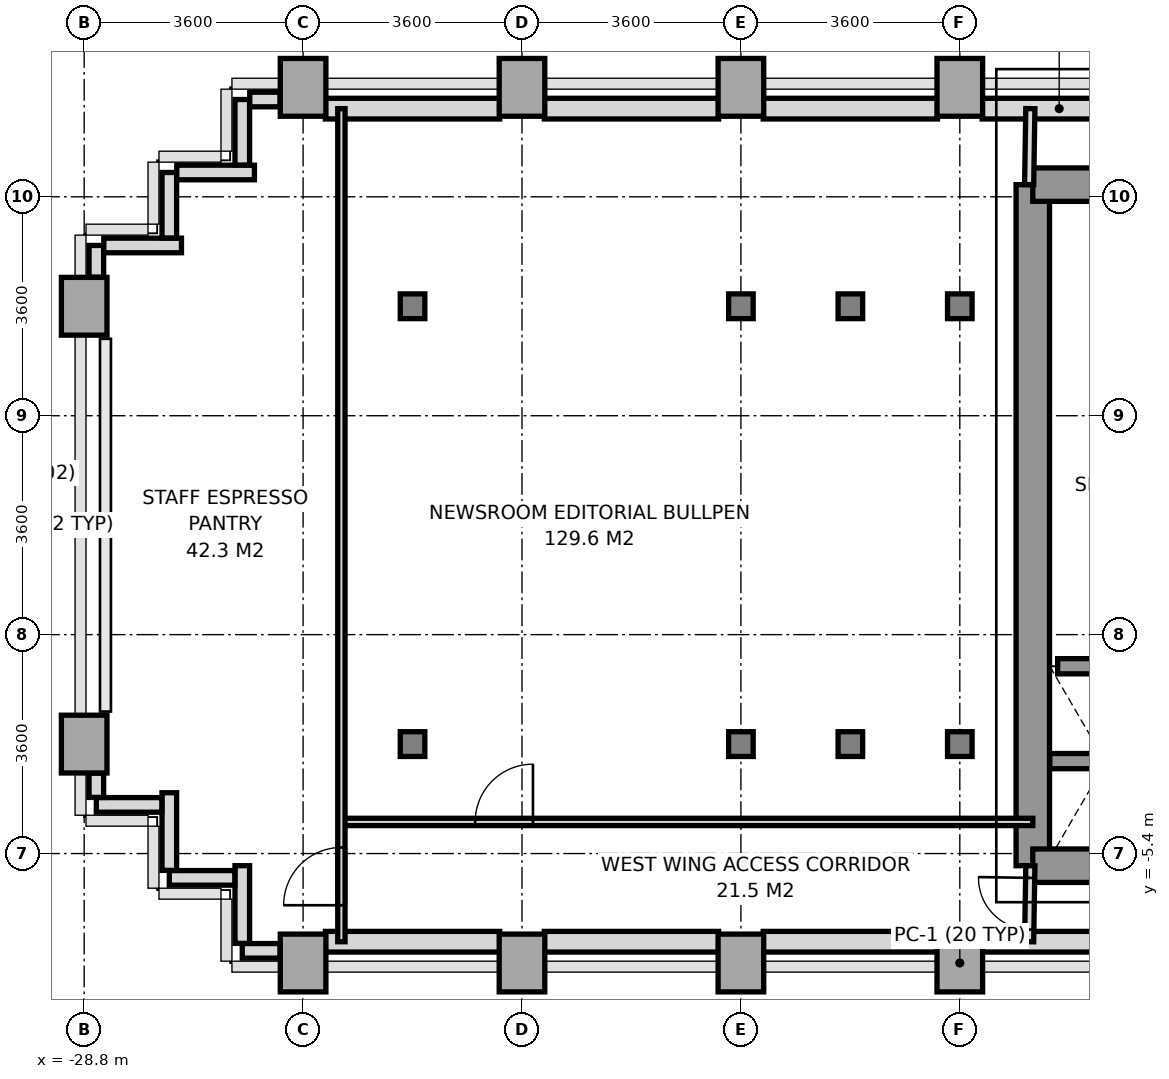
"""IFC4 building model, lengths in metres.
Left out: names, types, materials, properties, quantities, classifications, styles, units other than length and angle.
Written with IfcOpenShell. Run it as: python <this file> out.ifc"""

import sys

from ifc_helpers import new_model, si_unit, direction, frame, frame_2d, origin, origin_2d, place, context, subcontext, project, spatial, rectangle, i_section, extrude, source, transform, mapped, element, fill, save


model = new_model("IFC4")
c1 = context("Model", 3, precision=1e-05, world=origin(), true_north=direction((0.0, 1.0)))
c2 = subcontext(c1, "Body", "Model", "MODEL_VIEW")
j1 = project(units=[si_unit("LENGTHUNIT", "METRE"), si_unit("PLANEANGLEUNIT", "RADIAN")], contexts=[c1])
p1 = place(None, origin())
s1 = spatial("IfcSite", under=j1, at=p1, CompositionType="ELEMENT")
p2 = place(p1, origin())
s2 = spatial("IfcBuilding", under=s1, at=p2, CompositionType="ELEMENT")
p3 = place(p2, frame((0.0, 0.0, 34.0)))
s3 = spatial("IfcBuildingStorey", under=s2, at=p3, CompositionType="ELEMENT", Elevation=34.0)
m1 = source(origin(), c2, "Body", "SweptSolid", [
    extrude(rectangle(XDim=0.75, YDim=0.95, at=origin_2d()), origin(), (0.0, 0.0, 1.0), 3.2),
])
for number, where, z_axis, x_axis in (
    (1, (-28.8, -3.6, 0.0), (0.0, 0.0, 1.0), (1.0, 0.0, 0.0)),
    (2, (-28.8, 3.6, 0.0), (0.0, 0.0, 1.0), (1.0, 0.0, 0.0)),
    (3, (-25.2, -7.2, 0.0), (0.0, 0.0, 1.0), (1.0, 0.0, 0.0)),
    (4, (-25.2, 7.2, 0.0), (0.0, 0.0, 1.0), (1.0, 0.0, 0.0)),
):
    element("IfcColumn", number, at=place(p3, frame(where, z_axis=z_axis, x_axis=x_axis)), inside=s3, PredefinedType="COLUMN", context=c2, shape_type="MappedRepresentation", body=[
        mapped(m1, transform((0.0, 0.0, 0.0), x_axis=(1.0, 0.0, 0.0), y_axis=(0.0, 1.0, 0.0), z_axis=(0.0, 0.0, 1.0), scale=1.0)),
    ])
m2 = source(origin(), c2, "Body", "SweptSolid", [
    extrude(i_section(OverallWidth=0.404, OverallDepth=0.407, WebThickness=0.022, FlangeThickness=0.035, at=origin_2d()), origin(), (0.0, 0.0, 1.0), 3.2),
])
for number, where, z_axis, x_axis in (
    (5, (-23.4, -3.6, 0.0), (0.0, 0.0, 1.0), (1.0, 0.0, 0.0)),
    (6, (-23.4, 3.6, 0.0), (0.0, 0.0, 1.0), (1.0, 0.0, 0.0)),
):
    element("IfcColumn", number, at=place(p3, frame(where, z_axis=z_axis, x_axis=x_axis)), inside=s3, PredefinedType="COLUMN", context=c2, shape_type="MappedRepresentation", body=[
        mapped(m2, transform((0.0, 0.0, 0.0), x_axis=(1.0, 0.0, 0.0), y_axis=(0.0, 1.0, 0.0), z_axis=(0.0, 0.0, 1.0), scale=1.0)),
    ])
for number, where, z_axis, x_axis in (
    (7, (-21.6, -7.2, 0.0), (0.0, 0.0, 1.0), (1.0, 0.0, 0.0)),
    (8, (-21.6, 7.2, 0.0), (0.0, 0.0, 1.0), (1.0, 0.0, 0.0)),
    (9, (-18.0, -7.2, 0.0), (0.0, 0.0, 1.0), (1.0, 0.0, 0.0)),
):
    element("IfcColumn", number, at=place(p3, frame(where, z_axis=z_axis, x_axis=x_axis)), inside=s3, PredefinedType="COLUMN", context=c2, shape_type="MappedRepresentation", body=[
        mapped(m1, transform((0.0, 0.0, 0.0), x_axis=(1.0, 0.0, 0.0), y_axis=(0.0, 1.0, 0.0), z_axis=(0.0, 0.0, 1.0), scale=1.0)),
    ])
for number, where, z_axis, x_axis in (
    (10, (-18.0, -3.6, 0.0), (0.0, 0.0, 1.0), (1.0, 0.0, 0.0)),
    (11, (-18.0, 3.6, 0.0), (0.0, 0.0, 1.0), (1.0, 0.0, 0.0)),
):
    element("IfcColumn", number, at=place(p3, frame(where, z_axis=z_axis, x_axis=x_axis)), inside=s3, PredefinedType="COLUMN", context=c2, shape_type="MappedRepresentation", body=[
        mapped(m2, transform((0.0, 0.0, 0.0), x_axis=(1.0, 0.0, 0.0), y_axis=(0.0, 1.0, 0.0), z_axis=(0.0, 0.0, 1.0), scale=1.0)),
    ])
p4 = place(p3, frame((-18.0, 7.2, 0.0), z_axis=(0.0, 0.0, 1.0), x_axis=(1.0, 0.0, 0.0)))
e12 = element("IfcColumn", 12, at=p4, inside=s3, PredefinedType="COLUMN", context=c2, shape_type="MappedRepresentation", body=[
    mapped(m1, transform((0.0, 0.0, 0.0), x_axis=(1.0, 0.0, 0.0), y_axis=(0.0, 1.0, 0.0), z_axis=(0.0, 0.0, 1.0), scale=1.0)),
])
for number, where, z_axis, x_axis in (
    (13, (-16.2, -3.6, 0.0), (0.0, 0.0, 1.0), (1.0, 0.0, 0.0)),
    (14, (-16.2, 3.6, 0.0), (0.0, 0.0, 1.0), (1.0, 0.0, 0.0)),
):
    element("IfcColumn", number, at=place(p3, frame(where, z_axis=z_axis, x_axis=x_axis)), inside=s3, PredefinedType="COLUMN", context=c2, shape_type="MappedRepresentation", body=[
        mapped(m2, transform((0.0, 0.0, 0.0), x_axis=(1.0, 0.0, 0.0), y_axis=(0.0, 1.0, 0.0), z_axis=(0.0, 0.0, 1.0), scale=1.0)),
    ])
p5 = place(p3, frame((-14.4, -7.2, 0.0), z_axis=(0.0, 0.0, 1.0), x_axis=(1.0, 0.0, 0.0)))
e15 = element("IfcColumn", 15, at=p5, inside=s3, PredefinedType="COLUMN", context=c2, shape_type="MappedRepresentation", body=[
    mapped(m1, transform((0.0, 0.0, 0.0), x_axis=(1.0, 0.0, 0.0), y_axis=(0.0, 1.0, 0.0), z_axis=(0.0, 0.0, 1.0), scale=1.0)),
])
for number, where, z_axis, x_axis in (
    (16, (-14.4, -3.6, 0.0), (0.0, 0.0, 1.0), (1.0, 0.0, 0.0)),
    (17, (-14.4, 3.6, 0.0), (0.0, 0.0, 1.0), (1.0, 0.0, 0.0)),
):
    element("IfcColumn", number, at=place(p3, frame(where, z_axis=z_axis, x_axis=x_axis)), inside=s3, PredefinedType="COLUMN", context=c2, shape_type="MappedRepresentation", body=[
        mapped(m2, transform((0.0, 0.0, 0.0), x_axis=(1.0, 0.0, 0.0), y_axis=(0.0, 1.0, 0.0), z_axis=(0.0, 0.0, 1.0), scale=1.0)),
    ])
p6 = place(p3, frame((-14.4, 7.2, 0.0), z_axis=(0.0, 0.0, 1.0), x_axis=(1.0, 0.0, 0.0)))
e18 = element("IfcColumn", 18, at=p6, inside=s3, PredefinedType="COLUMN", context=c2, shape_type="MappedRepresentation", body=[
    mapped(m1, transform((0.0, 0.0, 0.0), x_axis=(1.0, 0.0, 0.0), y_axis=(0.0, 1.0, 0.0), z_axis=(0.0, 0.0, 1.0), scale=1.0)),
])
for number, where, z_axis, x_axis in (
    (19, (-24.833, 6.85, 0.0), (0.0, 0.0, 1.0), (1.0, 0.0, 0.0)),
    (20, (-21.233, 6.85, 0.0), (0.0, 0.0, 1.0), (1.0, 0.0, 0.0)),
    (21, (-17.633, 6.85, 0.0), (0.0, 0.0, 1.0), (1.0, 0.0, 0.0)),
):
    element("IfcWall", number, at=place(p3, frame(where, z_axis=z_axis, x_axis=x_axis)), inside=s3, PredefinedType="SOLIDWALL", context=c2, shape_type="SweptSolid", body=[
        extrude(rectangle(XDim=2.866, YDim=0.34, at=frame_2d((1.433, 0.0))), origin(), (0.0, 0.0, 1.0), 2.45),
    ])
p7 = place(p3, frame((-14.033, 6.85, 0.0), z_axis=(0.0, 0.0, 1.0), x_axis=(1.0, 0.0, 0.0)))
e22 = element("IfcWall", 22, at=p7, inside=s3, PredefinedType="SOLIDWALL", context=c2, shape_type="SweptSolid", body=[
    extrude(rectangle(XDim=2.535, YDim=0.34, at=frame_2d((1.268, 0.0))), origin(), (0.0, 0.0, 1.0), 3.2),
])
for number, where, z_axis, x_axis in (
    (23, (-24.833, -6.85, 0.0), (0.0, 0.0, 1.0), (1.0, 0.0, 0.0)),
    (24, (-21.233, -6.85, 0.0), (0.0, 0.0, 1.0), (1.0, 0.0, 0.0)),
    (25, (-17.633, -6.85, 0.0), (0.0, 0.0, 1.0), (1.0, 0.0, 0.0)),
):
    element("IfcWall", number, at=place(p3, frame(where, z_axis=z_axis, x_axis=x_axis)), inside=s3, PredefinedType="SOLIDWALL", context=c2, shape_type="SweptSolid", body=[
        extrude(rectangle(XDim=2.866, YDim=0.34, at=frame_2d((1.433, 0.0))), origin(), (0.0, 0.0, 1.0), 2.45),
    ])
p8 = place(p3, frame((-14.033, -6.85, 0.0), z_axis=(0.0, 0.0, 1.0), x_axis=(1.0, 0.0, 0.0)))
e26 = element("IfcWall", 26, at=p8, inside=s3, PredefinedType="SOLIDWALL", context=c2, shape_type="SweptSolid", body=[
    extrude(rectangle(XDim=2.283, YDim=0.34, at=frame_2d((1.142, 0.0))), origin(), (0.0, 0.0, 1.0), 3.2),
])
p9 = place(p3, frame((-25.578, -7.0, 0.0), z_axis=(0.0, 0.0, 1.0), x_axis=(-1.0, 0.0, 0.0)))
e27 = element("IfcWall", 27, at=p9, inside=s3, PredefinedType="PARAPET", context=c2, shape_type="SweptSolid", body=[
    extrude(rectangle(XDim=0.622, YDim=0.24, at=frame_2d((0.311, 0.0))), origin(), (0.0, 0.0, 1.0), 1.15),
])
p10 = place(p3, frame((-26.2, -6.877, 0.0), z_axis=(0.0, 0.0, 1.0), x_axis=(0.0, 1.0, 0.0)))
e28 = element("IfcWall", 28, at=p10, inside=s3, PredefinedType="PARAPET", context=c2, shape_type="SweptSolid", body=[
    extrude(rectangle(XDim=1.277, YDim=0.24, at=frame_2d((0.638, 0.0))), origin(), (0.0, 0.0, 1.0), 1.15),
])
p11 = place(p3, frame((-26.323, -5.8, 0.0), z_axis=(0.0, 0.0, 1.0), x_axis=(-1.0, 0.0, 0.0)))
e29 = element("IfcWall", 29, at=p11, inside=s3, PredefinedType="PARAPET", context=c2, shape_type="SweptSolid", body=[
    extrude(rectangle(XDim=1.077, YDim=0.24, at=frame_2d((0.539, 0.0))), origin(), (0.0, 0.0, 1.0), 1.15),
])
p12 = place(p3, frame((-27.4, -5.677, 0.0), z_axis=(0.0, 0.0, 1.0), x_axis=(0.0, 1.0, 0.0)))
e30 = element("IfcWall", 30, at=p12, inside=s3, PredefinedType="PARAPET", context=c2, shape_type="SweptSolid", body=[
    extrude(rectangle(XDim=1.277, YDim=0.24, at=frame_2d((0.639, 0.0))), origin(), (0.0, 0.0, 1.0), 1.15),
])
p13 = place(p3, frame((-27.523, -4.6, 0.0), z_axis=(0.0, 0.0, 1.0), x_axis=(-1.0, 0.0, 0.0)))
e31 = element("IfcWall", 31, at=p13, inside=s3, PredefinedType="PARAPET", context=c2, shape_type="SweptSolid", body=[
    extrude(rectangle(XDim=1.077, YDim=0.24, at=frame_2d((0.539, 0.0))), origin(), (0.0, 0.0, 1.0), 1.15),
])
p14 = place(p3, frame((-28.6, -4.477, 0.0), z_axis=(0.0, 0.0, 1.0), x_axis=(0.0, 1.0, 0.0)))
e32 = element("IfcWall", 32, at=p14, inside=s3, PredefinedType="PARAPET", context=c2, shape_type="SweptSolid", body=[
    extrude(rectangle(XDim=0.399, YDim=0.24, at=frame_2d((0.2, 0.0))), origin(), (0.0, 0.0, 1.0), 1.15),
])
p15 = place(p3, frame((-28.6, 4.078, 0.0), z_axis=(0.0, 0.0, 1.0), x_axis=(0.0, 1.0, 0.0)))
e33 = element("IfcWall", 33, at=p15, inside=s3, PredefinedType="PARAPET", context=c2, shape_type="SweptSolid", body=[
    extrude(rectangle(XDim=0.522, YDim=0.24, at=frame_2d((0.261, 0.0))), origin(), (0.0, 0.0, 1.0), 1.15),
])
p16 = place(p3, frame((-28.477, 4.6, 0.0), z_axis=(0.0, 0.0, 1.0), x_axis=(1.0, 0.0, 0.0)))
e34 = element("IfcWall", 34, at=p16, inside=s3, PredefinedType="PARAPET", context=c2, shape_type="SweptSolid", body=[
    extrude(rectangle(XDim=1.277, YDim=0.24, at=frame_2d((0.639, 0.0))), origin(), (0.0, 0.0, 1.0), 1.15),
])
p17 = place(p3, frame((-27.4, 4.723, 0.0), z_axis=(0.0, 0.0, 1.0), x_axis=(0.0, 1.0, 0.0)))
e35 = element("IfcWall", 35, at=p17, inside=s3, PredefinedType="PARAPET", context=c2, shape_type="SweptSolid", body=[
    extrude(rectangle(XDim=1.077, YDim=0.24, at=frame_2d((0.539, 0.0))), origin(), (0.0, 0.0, 1.0), 1.15),
])
p18 = place(p3, frame((-27.277, 5.8, 0.0), z_axis=(0.0, 0.0, 1.0), x_axis=(1.0, 0.0, 0.0)))
e36 = element("IfcWall", 36, at=p18, inside=s3, PredefinedType="PARAPET", context=c2, shape_type="SweptSolid", body=[
    extrude(rectangle(XDim=1.277, YDim=0.24, at=frame_2d((0.639, 0.0))), origin(), (0.0, 0.0, 1.0), 1.15),
])
p19 = place(p3, frame((-26.2, 5.923, 0.0), z_axis=(0.0, 0.0, 1.0), x_axis=(0.0, 1.0, 0.0)))
e37 = element("IfcWall", 37, at=p19, inside=s3, PredefinedType="PARAPET", context=c2, shape_type="SweptSolid", body=[
    extrude(rectangle(XDim=1.077, YDim=0.24, at=frame_2d((0.539, 0.0))), origin(), (0.0, 0.0, 1.0), 1.15),
])
p20 = place(p3, frame((-26.077, 7.0, 0.0), z_axis=(0.0, 0.0, 1.0), x_axis=(1.0, 0.0, 0.0)))
e38 = element("IfcWall", 38, at=p20, inside=s3, PredefinedType="PARAPET", context=c2, shape_type="SweptSolid", body=[
    extrude(rectangle(XDim=0.499, YDim=0.24, at=frame_2d((0.25, 0.0))), origin(), (0.0, 0.0, 1.0), 1.15),
])
p21 = place(p3, frame((-13.2, -5.6, 0.0), z_axis=(0.0, 0.0, 1.0), x_axis=(0.0, 1.0, 0.0)))
e39 = element("IfcWall", 39, at=p21, inside=s3, PredefinedType="SHEAR", context=c2, shape_type="SweptSolid", body=[
    extrude(rectangle(XDim=11.2, YDim=0.55, at=frame_2d((5.6, 0.0))), origin(), (0.0, 0.0, 1.0), 3.2),
])
p22 = place(p3, frame((-13.2, 5.6, 0.0), z_axis=(0.0, 0.0, 1.0), x_axis=(1.0, 0.0, 0.0)))
e40 = element("IfcWall", 40, at=p22, inside=s3, PredefinedType="SHEAR", context=c2, shape_type="SweptSolid", body=[
    extrude(rectangle(XDim=1.819, YDim=0.55, at=frame_2d((0.909, 0.0))), origin(), (0.0, 0.0, 1.0), 3.2),
])
p23 = place(p3, frame((-13.2, -5.6, 0.0), z_axis=(0.0, 0.0, 1.0), x_axis=(1.0, 0.0, 0.0)))
e41 = element("IfcWall", 41, at=p23, inside=s3, PredefinedType="SHEAR", context=c2, shape_type="SweptSolid", body=[
    extrude(rectangle(XDim=7.8, YDim=0.55, at=frame_2d((3.9, 0.0))), origin(), (0.0, 0.0, 1.0), 3.2),
])
p24 = place(p23, frame((3.6, 0.0, 0.0)))
e42 = element("IfcOpeningElement", 42, at=p24, cuts=e41, PredefinedType="OPENING", context=c2, shape_type="SweptSolid", body=[
    extrude(rectangle(XDim=1.2, YDim=2.2, at=frame_2d((0.6, 1.1))), frame((0.0, 0.285, 0.0), z_axis=(0.0, -1.0, 0.0), x_axis=(1.0, 0.0, 0.0)), (0.0, 0.0, 1.0), 0.57),
])
p25 = place(p3, frame((-12.92, -3.88, 0.0), z_axis=(0.0, 0.0, 1.0), x_axis=(1.0, 0.0, 0.0)))
e43 = element("IfcWall", 43, at=p25, inside=s3, PredefinedType="SOLIDWALL", context=c2, shape_type="SweptSolid", body=[
    extrude(rectangle(XDim=1.84, YDim=0.25, at=frame_2d((0.92, 0.0))), origin(), (0.0, 0.0, 1.0), 3.2),
])
p26 = place(p3, frame((-12.791, -2.32, 0.0), z_axis=(0.0, 0.0, 1.0), x_axis=(1.0, 0.0, 0.0)))
e44 = element("IfcWall", 44, at=p26, inside=s3, PredefinedType="SOLIDWALL", context=c2, shape_type="SweptSolid", body=[
    extrude(rectangle(XDim=1.582, YDim=0.25, at=frame_2d((0.791, 0.0))), origin(), (0.0, 0.0, 1.0), 3.2),
])
p27 = place(p3, frame((-13.26, 5.6, 0.0), z_axis=(0.0, 0.0, 1.0), x_axis=(0.016013571389, 0.999871774545, 0.0)))
e45 = element("IfcWall", 45, at=p27, inside=s3, PredefinedType="PARTITIONING", context=c2, shape_type="SweptSolid", body=[
    extrude(rectangle(XDim=1.25, YDim=0.15, at=frame_2d((0.625, 0.0))), origin(), (0.0, 0.0, 1.0), 3.2),
])
p28 = place(p3, frame((-13.26, -6.85, 0.0), z_axis=(0.0, 0.0, 1.0), x_axis=(0.016013571389, 0.999871774545, 0.0)))
e46 = element("IfcWall", 46, at=p28, inside=s3, PredefinedType="PARTITIONING", context=c2, shape_type="SweptSolid", body=[
    extrude(rectangle(XDim=1.25, YDim=0.15, at=frame_2d((0.625, 0.0))), origin(), (0.0, 0.0, 1.0), 3.2),
])
p29 = place(p28, frame((0.2, 0.0, 0.0)))
e47 = element("IfcOpeningElement", 47, at=p29, cuts=e46, PredefinedType="OPENING", context=c2, shape_type="SweptSolid", body=[
    extrude(rectangle(XDim=0.85, YDim=2.1, at=frame_2d((0.425, 1.05))), frame((0.0, 0.085, 0.0), z_axis=(0.0, -1.0, 0.0), x_axis=(1.0, 0.0, 0.0)), (0.0, 0.0, 1.0), 0.17),
])
p30 = place(p3, frame((-24.57, -4.88, 0.0), z_axis=(0.0, 0.0, 1.0), x_axis=(1.0, 0.0, 0.0)))
e48 = element("IfcWall", 48, at=p30, inside=s3, PredefinedType="PARTITIONING", context=c2, shape_type="SweptSolid", body=[
    extrude(rectangle(XDim=11.37, YDim=0.12, at=frame_2d((5.685, 0.0))), origin(), (0.0, 0.0, 1.0), 2.7),
])
p31 = place(p30, frame((2.2, 0.0, 0.0)))
e49 = element("IfcOpeningElement", 49, at=p31, cuts=e48, PredefinedType="OPENING", context=c2, shape_type="SweptSolid", body=[
    extrude(rectangle(XDim=0.95, YDim=2.15, at=frame_2d((0.475, 1.075))), frame((0.0, 0.07, 0.0), z_axis=(0.0, -1.0, 0.0), x_axis=(1.0, 0.0, 0.0)), (0.0, 0.0, 1.0), 0.14),
])
p32 = place(p3, frame((-24.57, -6.85, 0.0), z_axis=(0.0, 0.0, 1.0), x_axis=(0.0, 1.0, 0.0)))
e50 = element("IfcWall", 50, at=p32, inside=s3, PredefinedType="PARTITIONING", context=c2, shape_type="SweptSolid", body=[
    extrude(rectangle(XDim=13.7, YDim=0.12, at=frame_2d((6.85, 0.0))), origin(), (0.0, 0.0, 1.0), 2.71),
])
p33 = place(p32, frame((0.6, 0.0, 0.0)))
e51 = element("IfcOpeningElement", 51, at=p33, cuts=e50, PredefinedType="OPENING", context=c2, shape_type="SweptSolid", body=[
    extrude(rectangle(XDim=0.95, YDim=2.15, at=frame_2d((0.475, 1.075))), frame((0.0, 0.07, 0.0), z_axis=(0.0, -1.0, 0.0), x_axis=(1.0, 0.0, 0.0)), (0.0, 0.0, 1.0), 0.14),
])
m3 = source(origin(), c2, "Body", "SweptSolid", [
    extrude(rectangle(XDim=0.95, YDim=2.15, at=frame_2d((0.475, 1.075))), frame((0.0, 0.025, 0.0), z_axis=(0.0, -1.0, 0.0), x_axis=(1.0, 0.0, 0.0)), (0.0, 0.0, 1.0), 0.05),
])
p34 = place(p31, origin())
e52 = element("IfcDoor", 52, at=p34, inside=s3, OperationType="SINGLE_SWING_RIGHT", PredefinedType="DOOR", context=c2, shape_type="MappedRepresentation", body=[
    mapped(m3, transform((0.0, 0.0, 0.0), x_axis=(1.0, 0.0, 0.0), y_axis=(0.0, 1.0, 0.0), z_axis=(0.0, 0.0, 1.0), scale=1.0)),
])
fill(e49, e52)
p35 = place(p33, origin())
e53 = element("IfcDoor", 53, at=p35, inside=s3, OperationType="SINGLE_SWING_LEFT", PredefinedType="DOOR", context=c2, shape_type="MappedRepresentation", body=[
    mapped(m3, transform((0.0, 0.0, 0.0), x_axis=(1.0, 0.0, 0.0), y_axis=(0.0, 1.0, 0.0), z_axis=(0.0, 0.0, 1.0), scale=1.0)),
])
fill(e51, e53)
m4 = source(origin(), c2, "Body", "SweptSolid", [
    extrude(rectangle(XDim=0.85, YDim=2.1, at=frame_2d((0.425, 1.05))), frame((0.0, 0.025, 0.0), z_axis=(0.0, -1.0, 0.0), x_axis=(1.0, 0.0, 0.0)), (0.0, 0.0, 1.0), 0.05),
])
p36 = place(p29, origin())
e54 = element("IfcDoor", 54, at=p36, inside=s3, OperationType="SINGLE_SWING_RIGHT", PredefinedType="DOOR", context=c2, shape_type="MappedRepresentation", body=[
    mapped(m4, transform((0.0, 0.0, 0.0), x_axis=(1.0, 0.0, 0.0), y_axis=(0.0, 1.0, 0.0), z_axis=(0.0, 0.0, 1.0), scale=1.0)),
])
fill(e47, e54)
save(model, sys.argv[1])
